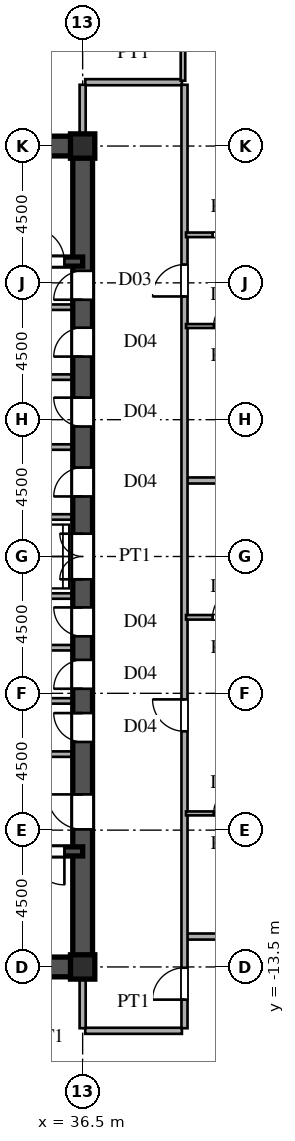
"""IFC4 building model, lengths in metres.
Left out: names, types, materials, properties, quantities, classifications, styles, units other than length and angle.
Written with IfcOpenShell. Run it as: python <this file> out.ifc"""

import sys

from ifc_helpers import new_model, si_unit, direction, frame, frame_2d, origin, origin_2d, place, context, subcontext, project, spatial, rectangle, i_section, extrude, source, transform, mapped, element, fill, save


model = new_model("IFC4")
c1 = context("Model", 3, precision=1e-05, world=origin(), true_north=direction((0.0, 1.0)))
c2 = subcontext(c1, "Body", "Model", "MODEL_VIEW")
j1 = project(units=[si_unit("LENGTHUNIT", "METRE"), si_unit("PLANEANGLEUNIT", "RADIAN")], contexts=[c1])
p1 = place(None, origin())
s1 = spatial("IfcSite", under=j1, at=p1, CompositionType="ELEMENT")
p2 = place(p1, origin())
s2 = spatial("IfcBuilding", under=s1, at=p2, CompositionType="ELEMENT")
p3 = place(p2, frame((0.0, 0.0, 99.6)))
s3 = spatial("IfcBuildingStorey", under=s2, at=p3, CompositionType="ELEMENT", Elevation=99.6)
m1 = source(origin(), c2, "Body", "SweptSolid", [
    extrude(i_section(OverallWidth=0.8, OverallDepth=0.8, WebThickness=0.032, FlangeThickness=0.05, at=origin_2d()), origin(), (0.0, 0.0, 1.0), 3.6),
])
for number, where, z_axis, x_axis in (
    (1, (36.5, -13.5, 0.0), (0.0, 0.0, 1.0), (1.0, 0.0, 0.0)),
    (2, (36.5, 13.5, 0.0), (0.0, 0.0, 1.0), (1.0, 0.0, 0.0)),
):
    element("IfcColumn", number, at=place(p3, frame(where, z_axis=z_axis, x_axis=x_axis)), inside=s3, PredefinedType="COLUMN", context=c2, shape_type="MappedRepresentation", body=[
        mapped(m1, transform((0.0, 0.0, 0.0), scale=1.0)),
    ])
for number, where, z_axis, x_axis in (
    (3, (27.5, -13.5, 0.0), (0.0, 0.0, 1.0), (1.0, 0.0, 0.0)),
    (4, (27.5, 13.5, 0.0), (0.0, 0.0, 1.0), (1.0, 0.0, 0.0)),
):
    element("IfcWall", number, at=place(p3, frame(where, z_axis=z_axis, x_axis=x_axis)), inside=s3, PredefinedType="SHEAR", context=c2, shape_type="SweptSolid", body=[
        extrude(rectangle(XDim=9.0, YDim=0.65, at=frame_2d((4.5, 0.0))), origin(), (0.0, 0.0, 1.0), 3.38),
    ])
p4 = place(p3, frame((36.5, -13.65, 0.0), z_axis=(0.0, 0.0, 1.0), x_axis=(0.0, 1.0, 0.0)))
e5 = element("IfcWall", 5, at=p4, inside=s3, PredefinedType="SHEAR", context=c2, shape_type="SweptSolid", body=[
    extrude(rectangle(XDim=7.15, YDim=0.65, at=frame_2d((3.575, 0.0))), origin(), (0.0, 0.0, 1.0), 3.38),
])
p5 = place(p4, frame((4.675, 0.0, 0.0)))
e6 = element("IfcOpeningElement", 6, at=p5, cuts=e5, PredefinedType="OPENING", context=c2, shape_type="SweptSolid", body=[
    extrude(rectangle(XDim=1.15, YDim=2.2, at=frame_2d((0.575, 1.1))), frame((0.0, 0.335, 0.0), z_axis=(0.0, -1.0, 0.0), x_axis=(1.0, 0.0, 0.0)), (0.0, 0.0, 1.0), 0.67),
])
p6 = place(p3, frame((36.5, -1.3, 0.0), z_axis=(0.0, 0.0, 1.0), x_axis=(0.0, 1.0, 0.0)))
e7 = element("IfcWall", 7, at=p6, inside=s3, PredefinedType="SHEAR", context=c2, shape_type="SweptSolid", body=[
    extrude(rectangle(XDim=2.6, YDim=0.65, at=frame_2d((1.3, 0.0))), origin(), (0.0, 0.0, 1.0), 3.38),
])
p7 = place(p6, frame((0.55, 0.0, 0.0)))
e8 = element("IfcOpeningElement", 8, at=p7, cuts=e7, PredefinedType="OPENING", context=c2, shape_type="SweptSolid", body=[
    extrude(rectangle(XDim=1.5, YDim=2.3, at=frame_2d((0.75, 1.15))), frame((0.0, 0.335, 0.0), z_axis=(0.0, -1.0, 0.0), x_axis=(1.0, 0.0, 0.0)), (0.0, 0.0, 1.0), 0.67),
])
p8 = place(p3, frame((36.5, 8.2, 0.0), z_axis=(0.0, 0.0, 1.0), x_axis=(0.0, 1.0, 0.0)))
e9 = element("IfcWall", 9, at=p8, inside=s3, PredefinedType="SHEAR", context=c2, shape_type="SweptSolid", body=[
    extrude(rectangle(XDim=5.45, YDim=0.65, at=frame_2d((2.725, 0.0))), origin(), (0.0, 0.0, 1.0), 3.38),
])
p9 = place(p8, frame((0.245, 0.0, 0.0)))
e10 = element("IfcOpeningElement", 10, at=p9, cuts=e9, PredefinedType="OPENING", context=c2, shape_type="SweptSolid", body=[
    extrude(rectangle(XDim=0.95, YDim=2.15, at=frame_2d((0.475, 1.075))), frame((0.0, 0.335, 0.0), z_axis=(0.0, -1.0, 0.0), x_axis=(1.0, 0.0, 0.0)), (0.0, 0.0, 1.0), 0.67),
])
p10 = place(p3, frame((36.5, -6.5, 0.0), z_axis=(0.0, 0.0, 1.0), x_axis=(0.0, 1.0, 0.0)))
e11 = element("IfcWall", 11, at=p10, inside=s3, PredefinedType="SHEAR", context=c2, shape_type="SweptSolid", body=[
    extrude(rectangle(XDim=1.75, YDim=0.65, at=frame_2d((0.875, 0.0))), origin(), (0.0, 0.0, 1.0), 3.38),
])
p11 = place(p10, frame((0.4, 0.0, 0.0)))
e12 = element("IfcOpeningElement", 12, at=p11, cuts=e11, PredefinedType="OPENING", context=c2, shape_type="SweptSolid", body=[
    extrude(rectangle(XDim=0.95, YDim=2.15, at=frame_2d((0.475, 1.075))), frame((0.0, 0.335, 0.0), z_axis=(0.0, -1.0, 0.0), x_axis=(1.0, 0.0, 0.0)), (0.0, 0.0, 1.0), 0.67),
])
p12 = place(p3, frame((36.5, -4.75, 0.0), z_axis=(0.0, 0.0, 1.0), x_axis=(0.0, 1.0, 0.0)))
e13 = element("IfcWall", 13, at=p12, inside=s3, PredefinedType="SHEAR", context=c2, shape_type="SweptSolid", body=[
    extrude(rectangle(XDim=1.75, YDim=0.65, at=frame_2d((0.875, 0.0))), origin(), (0.0, 0.0, 1.0), 3.38),
])
p13 = place(p12, frame((0.4, 0.0, 0.0)))
e14 = element("IfcOpeningElement", 14, at=p13, cuts=e13, PredefinedType="OPENING", context=c2, shape_type="SweptSolid", body=[
    extrude(rectangle(XDim=0.95, YDim=2.15, at=frame_2d((0.475, 1.075))), frame((0.0, 0.335, 0.0), z_axis=(0.0, -1.0, 0.0), x_axis=(1.0, 0.0, 0.0)), (0.0, 0.0, 1.0), 0.67),
])
p14 = place(p3, frame((36.5, -3.0, 0.0), z_axis=(0.0, 0.0, 1.0), x_axis=(0.0, 1.0, 0.0)))
e15 = element("IfcWall", 15, at=p14, inside=s3, PredefinedType="SHEAR", context=c2, shape_type="SweptSolid", body=[
    extrude(rectangle(XDim=1.7, YDim=0.65, at=frame_2d((0.85, 0.0))), origin(), (0.0, 0.0, 1.0), 3.38),
])
p15 = place(p14, frame((0.375, 0.0, 0.0)))
e16 = element("IfcOpeningElement", 16, at=p15, cuts=e15, PredefinedType="OPENING", context=c2, shape_type="SweptSolid", body=[
    extrude(rectangle(XDim=0.95, YDim=2.15, at=frame_2d((0.475, 1.075))), frame((0.0, 0.335, 0.0), z_axis=(0.0, -1.0, 0.0), x_axis=(1.0, 0.0, 0.0)), (0.0, 0.0, 1.0), 0.67),
])
p16 = place(p3, frame((36.5, 1.3, 0.0), z_axis=(0.0, 0.0, 1.0), x_axis=(0.0, 1.0, 0.0)))
e17 = element("IfcWall", 17, at=p16, inside=s3, PredefinedType="SHEAR", context=c2, shape_type="SweptSolid", body=[
    extrude(rectangle(XDim=2.3, YDim=0.65, at=frame_2d((1.15, 0.0))), origin(), (0.0, 0.0, 1.0), 3.38),
])
p17 = place(p16, frame((0.675, 0.0, 0.0)))
e18 = element("IfcOpeningElement", 18, at=p17, cuts=e17, PredefinedType="OPENING", context=c2, shape_type="SweptSolid", body=[
    extrude(rectangle(XDim=0.95, YDim=2.15, at=frame_2d((0.475, 1.075))), frame((0.0, 0.335, 0.0), z_axis=(0.0, -1.0, 0.0), x_axis=(1.0, 0.0, 0.0)), (0.0, 0.0, 1.0), 0.67),
])
p18 = place(p3, frame((36.5, 3.6, 0.0), z_axis=(0.0, 0.0, 1.0), x_axis=(0.0, 1.0, 0.0)))
e19 = element("IfcWall", 19, at=p18, inside=s3, PredefinedType="SHEAR", context=c2, shape_type="SweptSolid", body=[
    extrude(rectangle(XDim=2.3, YDim=0.65, at=frame_2d((1.15, 0.0))), origin(), (0.0, 0.0, 1.0), 3.38),
])
p19 = place(p18, frame((0.675, 0.0, 0.0)))
e20 = element("IfcOpeningElement", 20, at=p19, cuts=e19, PredefinedType="OPENING", context=c2, shape_type="SweptSolid", body=[
    extrude(rectangle(XDim=0.95, YDim=2.15, at=frame_2d((0.475, 1.075))), frame((0.0, 0.335, 0.0), z_axis=(0.0, -1.0, 0.0), x_axis=(1.0, 0.0, 0.0)), (0.0, 0.0, 1.0), 0.67),
])
p20 = place(p3, frame((36.5, 5.9, 0.0), z_axis=(0.0, 0.0, 1.0), x_axis=(0.0, 1.0, 0.0)))
e21 = element("IfcWall", 21, at=p20, inside=s3, PredefinedType="SHEAR", context=c2, shape_type="SweptSolid", body=[
    extrude(rectangle(XDim=2.3, YDim=0.65, at=frame_2d((1.15, 0.0))), origin(), (0.0, 0.0, 1.0), 3.38),
])
p21 = place(p20, frame((0.675, 0.0, 0.0)))
e22 = element("IfcOpeningElement", 22, at=p21, cuts=e21, PredefinedType="OPENING", context=c2, shape_type="SweptSolid", body=[
    extrude(rectangle(XDim=0.95, YDim=2.15, at=frame_2d((0.475, 1.075))), frame((0.0, 0.335, 0.0), z_axis=(0.0, -1.0, 0.0), x_axis=(1.0, 0.0, 0.0)), (0.0, 0.0, 1.0), 0.67),
])
p22 = place(p3, frame((27.5, -9.7, 0.0), z_axis=(0.0, 0.0, 1.0), x_axis=(1.0, 0.0, 0.0)))
e23 = element("IfcWall", 23, at=p22, inside=s3, PredefinedType="SHEAR", context=c2, shape_type="SweptSolid", body=[
    extrude(rectangle(XDim=9.0, YDim=0.3, at=frame_2d((4.5, 0.0))), origin(), (0.0, 0.0, 1.0), 3.38),
])
p23 = place(p22, frame((7.3, 0.0, 0.0)))
e24 = element("IfcOpeningElement", 24, at=p23, cuts=e23, PredefinedType="OPENING", context=c2, shape_type="SweptSolid", body=[
    extrude(rectangle(XDim=1.1, YDim=2.2, at=frame_2d((0.55, 1.1))), frame((0.0, 0.16, 0.0), z_axis=(0.0, -1.0, 0.0), x_axis=(1.0, 0.0, 0.0)), (0.0, 0.0, 1.0), 0.32),
])
p24 = place(p3, frame((27.5, 9.7, 0.0), z_axis=(0.0, 0.0, 1.0), x_axis=(1.0, 0.0, 0.0)))
e25 = element("IfcWall", 25, at=p24, inside=s3, PredefinedType="SHEAR", context=c2, shape_type="SweptSolid", body=[
    extrude(rectangle(XDim=9.0, YDim=0.3, at=frame_2d((4.5, 0.0))), origin(), (0.0, 0.0, 1.0), 3.38),
])
p25 = place(p24, frame((7.3, 0.0, 0.0)))
e26 = element("IfcOpeningElement", 26, at=p25, cuts=e25, PredefinedType="OPENING", context=c2, shape_type="SweptSolid", body=[
    extrude(rectangle(XDim=1.1, YDim=2.2, at=frame_2d((0.55, 1.1))), frame((0.0, 0.16, 0.0), z_axis=(0.0, -1.0, 0.0), x_axis=(1.0, 0.0, 0.0)), (0.0, 0.0, 1.0), 0.32),
])
for number, where, z_axis, x_axis in (
    (27, (30.45, -6.5, 0.0), (0.0, 0.0, 1.0), (1.0, 0.0, 0.0)),
    (28, (30.45, 8.2, 0.0), (0.0, 0.0, 1.0), (1.0, 0.0, 0.0)),
):
    element("IfcWall", number, at=place(p3, frame(where, z_axis=z_axis, x_axis=x_axis)), inside=s3, PredefinedType="PARTITIONING", context=c2, shape_type="SweptSolid", body=[
        extrude(rectangle(XDim=5.7, YDim=0.18, at=frame_2d((2.85, 0.0))), origin(), (0.0, 0.0, 1.0), 3.38),
    ])
for number, where, z_axis, x_axis in (
    (29, (33.2, -1.3, 0.0), (0.0, 0.0, 1.0), (1.0, 0.0, 0.0)),
    (30, (33.2, 1.3, 0.0), (0.0, 0.0, 1.0), (1.0, 0.0, 0.0)),
    (31, (33.2, -4.75, 0.0), (0.0, 0.0, 1.0), (1.0, 0.0, 0.0)),
    (32, (33.2, -3.0, 0.0), (0.0, 0.0, 1.0), (1.0, 0.0, 0.0)),
    (33, (33.2, 3.6, 0.0), (0.0, 0.0, 1.0), (1.0, 0.0, 0.0)),
    (34, (33.2, 5.9, 0.0), (0.0, 0.0, 1.0), (1.0, 0.0, 0.0)),
):
    element("IfcWall", number, at=place(p3, frame(where, z_axis=z_axis, x_axis=x_axis)), inside=s3, PredefinedType="PARTITIONING", context=c2, shape_type="SweptSolid", body=[
        extrude(rectangle(XDim=2.95, YDim=0.18, at=frame_2d((1.475, 0.0))), origin(), (0.0, 0.0, 1.0), 3.38),
    ])
p26 = place(p3, frame((36.585, -15.6, 0.0), z_axis=(0.0, 0.0, 1.0), x_axis=(1.0, 0.0, 0.0)))
e35 = element("IfcWall", 35, at=p26, inside=s3, PredefinedType="PARTITIONING", context=c2, shape_type="SweptSolid", body=[
    extrude(rectangle(XDim=3.18, YDim=0.2, at=frame_2d((1.59, 0.0))), origin(), (0.0, 0.0, 1.0), 3.38),
])
p27 = place(p3, frame((39.93, -12.5, 0.0), z_axis=(0.0, 0.0, 1.0), x_axis=(1.0, 0.0, 0.0)))
e36 = element("IfcWall", 36, at=p27, inside=s3, PredefinedType="PARTITIONING", context=c2, shape_type="SweptSolid", body=[
    extrude(rectangle(XDim=19.971, YDim=0.2, at=frame_2d((9.985, 0.0))), origin(), (0.0, 0.0, 1.0), 3.38),
])
p28 = place(p3, frame((39.9, -8.45, 0.0), z_axis=(0.0, 0.0, 1.0), x_axis=(1.0, 0.0, 0.0)))
e37 = element("IfcWall", 37, at=p28, inside=s3, PredefinedType="PARTITIONING", context=c2, shape_type="SweptSolid", body=[
    extrude(rectangle(XDim=2.7, YDim=0.13, at=frame_2d((1.35, 0.0))), origin(), (0.0, 0.0, 1.0), 3.38),
])
p29 = place(p28, frame((0.91, 0.0, 0.0)))
e38 = element("IfcOpeningElement", 38, at=p29, cuts=e37, PredefinedType="OPENING", context=c2, shape_type="SweptSolid", body=[
    extrude(rectangle(XDim=0.88, YDim=2.1, at=frame_2d((0.44, 1.05))), frame((0.0, 0.075, 0.0), z_axis=(0.0, -1.0, 0.0), x_axis=(1.0, 0.0, 0.0)), (0.0, 0.0, 1.0), 0.15),
])
p30 = place(p3, frame((39.9, -2.0, 0.0), z_axis=(0.0, 0.0, 1.0), x_axis=(1.0, 0.0, 0.0)))
e39 = element("IfcWall", 39, at=p30, inside=s3, PredefinedType="PARTITIONING", context=c2, shape_type="SweptSolid", body=[
    extrude(rectangle(XDim=2.7, YDim=0.15, at=frame_2d((1.35, 0.0))), origin(), (0.0, 0.0, 1.0), 3.38),
])
p31 = place(p30, frame((0.875, 0.0, 0.0)))
e40 = element("IfcOpeningElement", 40, at=p31, cuts=e39, PredefinedType="OPENING", context=c2, shape_type="SweptSolid", body=[
    extrude(rectangle(XDim=0.95, YDim=2.15, at=frame_2d((0.475, 1.075))), frame((0.0, 0.085, 0.0), z_axis=(0.0, -1.0, 0.0), x_axis=(1.0, 0.0, 0.0)), (0.0, 0.0, 1.0), 0.17),
])
p32 = place(p3, frame((39.93, 2.5, 0.0), z_axis=(0.0, 0.0, 1.0), x_axis=(1.0, 0.0, 0.0)))
e41 = element("IfcWall", 41, at=p32, inside=s3, PredefinedType="PARTITIONING", context=c2, shape_type="SweptSolid", body=[
    extrude(rectangle(XDim=31.075, YDim=0.2, at=frame_2d((15.538, 0.0))), origin(), (0.0, 0.0, 1.0), 3.38),
])
p33 = place(p3, frame((39.9, 7.58, 0.0), z_axis=(0.0, 0.0, 1.0), x_axis=(1.0, 0.0, 0.0)))
e42 = element("IfcWall", 42, at=p33, inside=s3, PredefinedType="PARTITIONING", context=c2, shape_type="SweptSolid", body=[
    extrude(rectangle(XDim=2.7, YDim=0.13, at=frame_2d((1.35, 0.0))), origin(), (0.0, 0.0, 1.0), 3.38),
])
p34 = place(p33, frame((0.91, 0.0, 0.0)))
e43 = element("IfcOpeningElement", 43, at=p34, cuts=e42, PredefinedType="OPENING", context=c2, shape_type="SweptSolid", body=[
    extrude(rectangle(XDim=0.88, YDim=2.1, at=frame_2d((0.44, 1.05))), frame((0.0, 0.075, 0.0), z_axis=(0.0, -1.0, 0.0), x_axis=(1.0, 0.0, 0.0)), (0.0, 0.0, 1.0), 0.15),
])
p35 = place(p3, frame((39.9, 10.58, 0.0), z_axis=(0.0, 0.0, 1.0), x_axis=(1.0, 0.0, 0.0)))
e44 = element("IfcWall", 44, at=p35, inside=s3, PredefinedType="PARTITIONING", context=c2, shape_type="SweptSolid", body=[
    extrude(rectangle(XDim=2.7, YDim=0.15, at=frame_2d((1.35, 0.0))), origin(), (0.0, 0.0, 1.0), 3.38),
])
p36 = place(p35, frame((0.875, 0.0, 0.0)))
e45 = element("IfcOpeningElement", 45, at=p36, cuts=e44, PredefinedType="OPENING", context=c2, shape_type="SweptSolid", body=[
    extrude(rectangle(XDim=0.95, YDim=2.15, at=frame_2d((0.475, 1.075))), frame((0.0, 0.085, 0.0), z_axis=(0.0, -1.0, 0.0), x_axis=(1.0, 0.0, 0.0)), (0.0, 0.0, 1.0), 0.17),
])
p37 = place(p3, frame((36.585, 15.6, 0.0), z_axis=(0.0, 0.0, 1.0), x_axis=(1.0, 0.0, 0.0)))
e46 = element("IfcWall", 46, at=p37, inside=s3, PredefinedType="PARTITIONING", context=c2, shape_type="SweptSolid", body=[
    extrude(rectangle(XDim=3.18, YDim=0.2, at=frame_2d((1.59, 0.0))), origin(), (0.0, 0.0, 1.0), 3.38),
])
for number, where, z_axis, x_axis in (
    (47, (36.5, -15.515, 0.0), (0.0, 0.0, 1.0), (0.0, 1.0, 0.0)),
    (48, (36.5, 13.83, 0.0), (0.0, 0.0, 1.0), (0.0, 1.0, 0.0)),
):
    element("IfcWall", number, at=place(p3, frame(where, z_axis=z_axis, x_axis=x_axis)), inside=s3, PredefinedType="PARTITIONING", context=c2, shape_type="SweptSolid", body=[
        extrude(rectangle(XDim=1.685, YDim=0.2, at=frame_2d((0.842, 0.0))), origin(), (0.0, 0.0, 1.0), 2.68),
    ])
p38 = place(p3, frame((39.8, 15.65, 0.0), z_axis=(0.0, 0.0, 1.0), x_axis=(0.0, 1.0, 0.0)))
e49 = element("IfcWall", 49, at=p38, inside=s3, PredefinedType="PARTITIONING", context=c2, shape_type="SweptSolid", body=[
    extrude(rectangle(XDim=5.925, YDim=0.15, at=frame_2d((2.962, 0.0))), origin(), (0.0, 0.0, 1.0), 3.38),
])
p39 = place(p38, frame((1.425, 0.0, 0.0)))
e50 = element("IfcOpeningElement", 50, at=p39, cuts=e49, PredefinedType="OPENING", context=c2, shape_type="SweptSolid", body=[
    extrude(rectangle(XDim=0.95, YDim=2.15, at=frame_2d((0.475, 1.075))), frame((0.0, 0.085, 0.0), z_axis=(0.0, -1.0, 0.0), x_axis=(1.0, 0.0, 0.0)), (0.0, 0.0, 1.0), 0.17),
])
p40 = place(p3, frame((39.85, -15.515, 0.0), z_axis=(0.0, 0.0, 1.0), x_axis=(0.0, 1.0, 0.0)))
e51 = element("IfcWall", 51, at=p40, inside=s3, PredefinedType="PARTITIONING", context=c2, shape_type="SweptSolid", body=[
    extrude(rectangle(XDim=31.03, YDim=0.2, at=frame_2d((15.515, 0.0))), origin(), (0.0, 0.0, 1.0), 3.38),
])
p41 = place(p40, frame((0.94, 0.0, 0.0)))
e52 = element("IfcOpeningElement", 52, at=p41, cuts=e51, PredefinedType="OPENING", context=c2, shape_type="SweptSolid", body=[
    extrude(rectangle(XDim=1.05, YDim=2.25, at=frame_2d((0.525, 1.125))), frame((0.0, 0.11, 0.0), z_axis=(0.0, -1.0, 0.0), x_axis=(1.0, 0.0, 0.0)), (0.0, 0.0, 1.0), 0.22),
])
p42 = place(p40, frame((9.765, 0.0, 0.0)))
e53 = element("IfcOpeningElement", 53, at=p42, cuts=e51, PredefinedType="OPENING", context=c2, shape_type="SweptSolid", body=[
    extrude(rectangle(XDim=1.05, YDim=2.25, at=frame_2d((0.525, 1.125))), frame((0.0, 0.11, 0.0), z_axis=(0.0, -1.0, 0.0), x_axis=(1.0, 0.0, 0.0)), (0.0, 0.0, 1.0), 0.22),
])
p43 = place(p40, frame((24.067, 0.0, 0.0)))
e54 = element("IfcOpeningElement", 54, at=p43, cuts=e51, PredefinedType="OPENING", context=c2, shape_type="SweptSolid", body=[
    extrude(rectangle(XDim=1.05, YDim=2.25, at=frame_2d((0.525, 1.125))), frame((0.0, 0.11, 0.0), z_axis=(0.0, -1.0, 0.0), x_axis=(1.0, 0.0, 0.0)), (0.0, 0.0, 1.0), 0.22),
])
m2 = source(origin(), c2, "Body", "SweptSolid", [
    extrude(rectangle(XDim=1.15, YDim=2.2, at=frame_2d((0.575, 1.1))), frame((0.0, 0.025, 0.0), z_axis=(0.0, -1.0, 0.0), x_axis=(1.0, 0.0, 0.0)), (0.0, 0.0, 1.0), 0.05),
])
p44 = place(p5, origin())
e55 = element("IfcDoor", 55, at=p44, inside=s3, OperationType="SINGLE_SWING_RIGHT", PredefinedType="DOOR", context=c2, shape_type="MappedRepresentation", body=[
    mapped(m2, transform((0.0, 0.0, 0.0), scale=1.0)),
])
fill(e6, e55)
m3 = source(origin(), c2, "Body", "SweptSolid", [
    extrude(rectangle(XDim=1.5, YDim=2.3, at=frame_2d((0.75, 1.15))), frame((0.0, 0.025, 0.0), z_axis=(0.0, -1.0, 0.0), x_axis=(1.0, 0.0, 0.0)), (0.0, 0.0, 1.0), 0.05),
])
p45 = place(p7, origin())
e56 = element("IfcDoor", 56, at=p45, inside=s3, OperationType="DOUBLE_SWING_LEFT", PredefinedType="DOOR", context=c2, shape_type="MappedRepresentation", body=[
    mapped(m3, transform((0.0, 0.0, 0.0), scale=1.0)),
])
fill(e8, e56)
m4 = source(origin(), c2, "Body", "SweptSolid", [
    extrude(rectangle(XDim=0.95, YDim=2.15, at=frame_2d((0.475, 1.075))), frame((0.0, 0.025, 0.0), z_axis=(0.0, -1.0, 0.0), x_axis=(1.0, 0.0, 0.0)), (0.0, 0.0, 1.0), 0.05),
])
p46 = place(p9, origin())
e57 = element("IfcDoor", 57, at=p46, inside=s3, OperationType="SINGLE_SWING_LEFT", PredefinedType="DOOR", context=c2, shape_type="MappedRepresentation", body=[
    mapped(m4, transform((0.0, 0.0, 0.0), scale=1.0)),
])
fill(e10, e57)
p47 = place(p11, origin())
e58 = element("IfcDoor", 58, at=p47, inside=s3, OperationType="SINGLE_SWING_RIGHT", PredefinedType="DOOR", context=c2, shape_type="MappedRepresentation", body=[
    mapped(m4, transform((0.0, 0.0, 0.0), scale=1.0)),
])
fill(e12, e58)
p48 = place(p13, origin())
e59 = element("IfcDoor", 59, at=p48, inside=s3, OperationType="SINGLE_SWING_LEFT", PredefinedType="DOOR", context=c2, shape_type="MappedRepresentation", body=[
    mapped(m4, transform((0.0, 0.0, 0.0), scale=1.0)),
])
fill(e14, e59)
p49 = place(p15, origin())
e60 = element("IfcDoor", 60, at=p49, inside=s3, OperationType="SINGLE_SWING_RIGHT", PredefinedType="DOOR", context=c2, shape_type="MappedRepresentation", body=[
    mapped(m4, transform((0.0, 0.0, 0.0), scale=1.0)),
])
fill(e16, e60)
p50 = place(p17, origin())
e61 = element("IfcDoor", 61, at=p50, inside=s3, OperationType="SINGLE_SWING_LEFT", PredefinedType="DOOR", context=c2, shape_type="MappedRepresentation", body=[
    mapped(m4, transform((0.0, 0.0, 0.0), scale=1.0)),
])
fill(e18, e61)
p51 = place(p19, origin())
e62 = element("IfcDoor", 62, at=p51, inside=s3, OperationType="SINGLE_SWING_RIGHT", PredefinedType="DOOR", context=c2, shape_type="MappedRepresentation", body=[
    mapped(m4, transform((0.0, 0.0, 0.0), scale=1.0)),
])
fill(e20, e62)
p52 = place(p21, origin())
e63 = element("IfcDoor", 63, at=p52, inside=s3, OperationType="SINGLE_SWING_LEFT", PredefinedType="DOOR", context=c2, shape_type="MappedRepresentation", body=[
    mapped(m4, transform((0.0, 0.0, 0.0), scale=1.0)),
])
fill(e22, e63)
m5 = source(origin(), c2, "Body", "SweptSolid", [
    extrude(rectangle(XDim=1.1, YDim=2.2, at=frame_2d((0.55, 1.1))), frame((0.0, 0.025, 0.0), z_axis=(0.0, -1.0, 0.0), x_axis=(1.0, 0.0, 0.0)), (0.0, 0.0, 1.0), 0.05),
])
p53 = place(p23, frame((1.1, 0.0, 0.0), z_axis=(0.0, 0.0, 1.0), x_axis=(-1.0, 0.0, 0.0)))
e64 = element("IfcDoor", 64, at=p53, inside=s3, OperationType="SINGLE_SWING_RIGHT", PredefinedType="DOOR", context=c2, shape_type="MappedRepresentation", body=[
    mapped(m5, transform((0.0, 0.0, 0.0), scale=1.0)),
])
fill(e24, e64)
p54 = place(p25, origin())
e65 = element("IfcDoor", 65, at=p54, inside=s3, OperationType="SINGLE_SWING_LEFT", PredefinedType="DOOR", context=c2, shape_type="MappedRepresentation", body=[
    mapped(m5, transform((0.0, 0.0, 0.0), scale=1.0)),
])
fill(e26, e65)
m6 = source(origin(), c2, "Body", "SweptSolid", [
    extrude(rectangle(XDim=0.88, YDim=2.1, at=frame_2d((0.44, 1.05))), frame((0.0, 0.025, 0.0), z_axis=(0.0, -1.0, 0.0), x_axis=(1.0, 0.0, 0.0)), (0.0, 0.0, 1.0), 0.05),
])
p55 = place(p29, origin())
e66 = element("IfcDoor", 66, at=p55, inside=s3, OperationType="SINGLE_SWING_RIGHT", PredefinedType="DOOR", context=c2, shape_type="MappedRepresentation", body=[
    mapped(m6, transform((0.0, 0.0, 0.0), scale=1.0)),
])
fill(e38, e66)
m7 = source(origin(), c2, "Body", "SweptSolid", [
    extrude(rectangle(XDim=0.95, YDim=2.15, at=frame_2d((0.475, 1.075))), frame((0.0, 0.025, 0.0), z_axis=(0.0, -1.0, 0.0), x_axis=(1.0, 0.0, 0.0)), (0.0, 0.0, 1.0), 0.05),
])
p56 = place(p31, origin())
e67 = element("IfcDoor", 67, at=p56, inside=s3, OperationType="SINGLE_SWING_RIGHT", PredefinedType="DOOR", context=c2, shape_type="MappedRepresentation", body=[
    mapped(m7, transform((0.0, 0.0, 0.0), scale=1.0)),
])
fill(e40, e67)
p57 = place(p34, origin())
e68 = element("IfcDoor", 68, at=p57, inside=s3, OperationType="SINGLE_SWING_RIGHT", PredefinedType="DOOR", context=c2, shape_type="MappedRepresentation", body=[
    mapped(m6, transform((0.0, 0.0, 0.0), scale=1.0)),
])
fill(e43, e68)
m8 = source(origin(), c2, "Body", "SweptSolid", [
    extrude(rectangle(XDim=1.05, YDim=2.25, at=frame_2d((0.525, 1.125))), frame((0.0, 0.025, 0.0), z_axis=(0.0, -1.0, 0.0), x_axis=(1.0, 0.0, 0.0)), (0.0, 0.0, 1.0), 0.05),
])
p58 = place(p41, origin())
e69 = element("IfcDoor", 69, at=p58, inside=s3, OperationType="SINGLE_SWING_LEFT", PredefinedType="DOOR", context=c2, shape_type="MappedRepresentation", body=[
    mapped(m8, transform((0.0, 0.0, 0.0), scale=1.0)),
])
fill(e52, e69)
p59 = place(p42, origin())
e70 = element("IfcDoor", 70, at=p59, inside=s3, OperationType="SINGLE_SWING_RIGHT", PredefinedType="DOOR", context=c2, shape_type="MappedRepresentation", body=[
    mapped(m8, transform((0.0, 0.0, 0.0), scale=1.0)),
])
fill(e53, e70)
p60 = place(p43, origin())
e71 = element("IfcDoor", 71, at=p60, inside=s3, OperationType="SINGLE_SWING_LEFT", PredefinedType="DOOR", context=c2, shape_type="MappedRepresentation", body=[
    mapped(m8, transform((0.0, 0.0, 0.0), scale=1.0)),
])
fill(e54, e71)
save(model, sys.argv[1])
